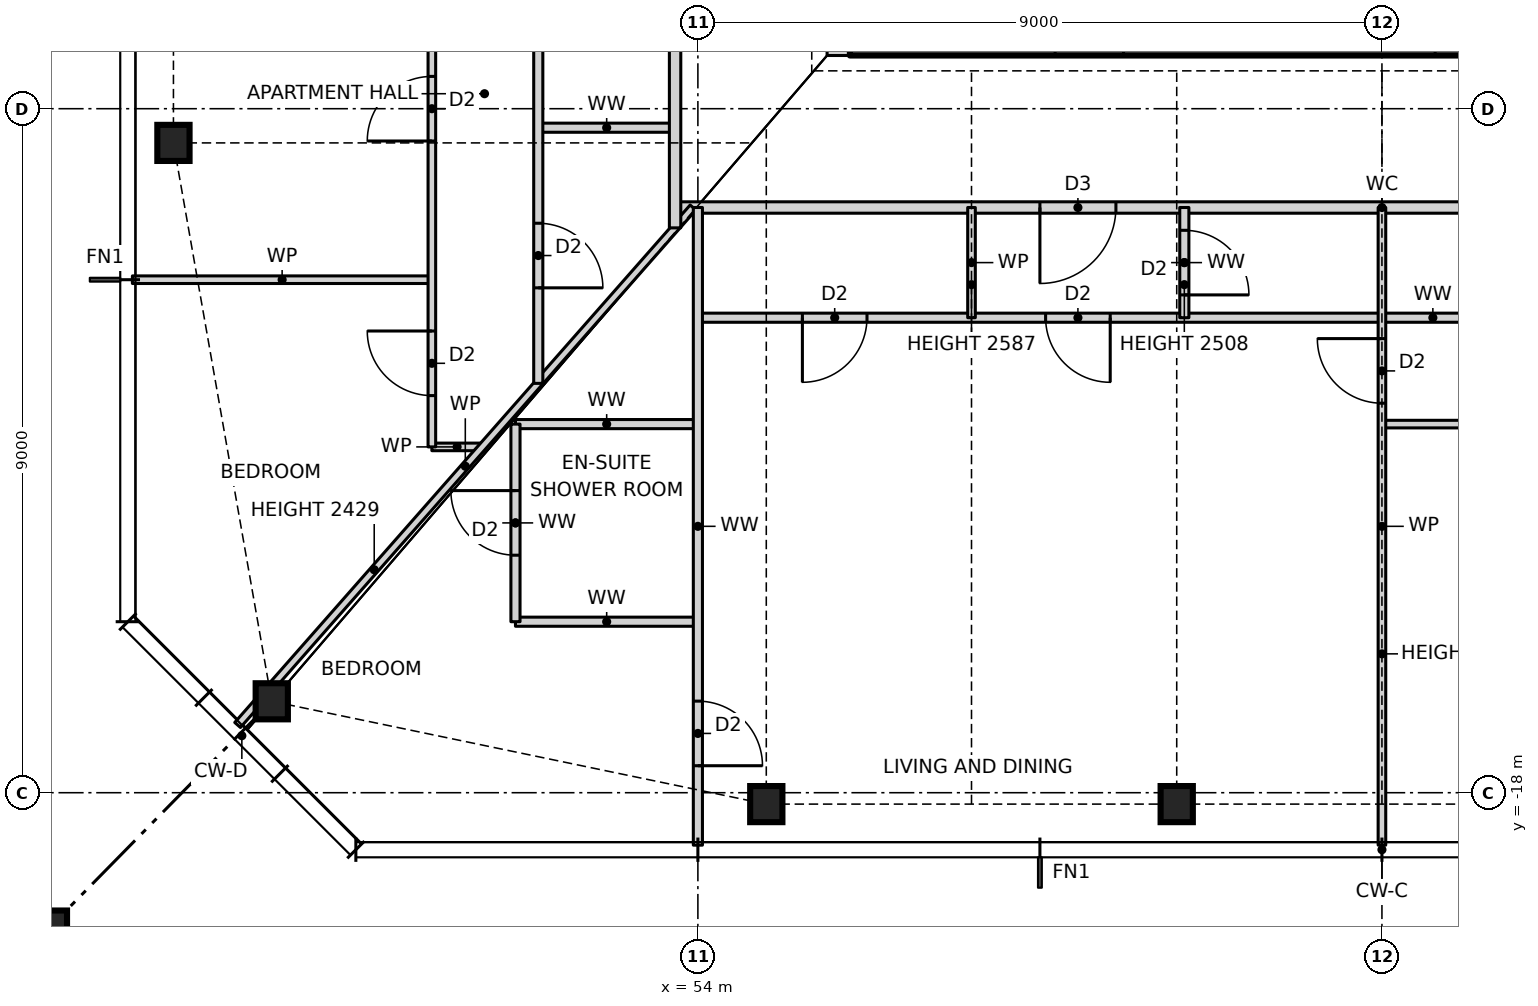
"""IFC4 building model, lengths in metres.
Left out: names, types, materials, properties, quantities, classifications, styles, units other than length and angle.
Written with IfcOpenShell. Run it as: python <this file> out.ifc"""

import sys

from ifc_helpers import new_model, si_unit, direction, frame, frame_2d, origin, origin_2d, place, context, subcontext, project, spatial, rectangle, hollow_rectangle, i_section, extrude, element, fill, save


model = new_model("IFC4")
c1 = context("Model", 3, precision=1e-05, world=origin(), true_north=direction((0.0, 1.0)))
c2 = subcontext(c1, "Body", "Model", "MODEL_VIEW")
j1 = project(units=[si_unit("LENGTHUNIT", "METRE"), si_unit("PLANEANGLEUNIT", "RADIAN")], contexts=[c1])
p1 = place(None, origin())
s1 = spatial("IfcSite", under=j1, at=p1, CompositionType="ELEMENT")
p2 = place(p1, origin())
s2 = spatial("IfcBuilding", under=s1, at=p2, CompositionType="ELEMENT")
p3 = place(p2, frame((0.0, 0.0, 53.5)))
s3 = spatial("IfcBuildingStorey", under=s2, at=p3, CompositionType="ELEMENT", Elevation=53.5)
for number, where, z_axis, x_axis in (
    (1, (48.394, -16.797, 0.0), (0.0, 0.0, 1.0), (1.0, 0.0, 0.0)),
    (2, (54.9, -18.15, 0.0), (0.0, 0.0, 1.0), (1.0, 0.0, 0.0)),
    (3, (60.3, -18.15, 0.0), (0.0, 0.0, 1.0), (1.0, 0.0, 0.0)),
    (4, (47.1, -9.45, 0.0), (0.0, 0.0, 1.0), (1.0, 0.0, 0.0)),
):
    element("IfcColumn", number, at=place(p3, frame(where, z_axis=z_axis, x_axis=x_axis)), inside=s3, PredefinedType="COLUMN", context=c2, shape_type="SweptSolid", body=[
        extrude(i_section(OverallWidth=0.424, OverallDepth=0.475, WebThickness=0.048, FlangeThickness=0.077, at=origin_2d()), origin(), (0.0, 0.0, 1.0), 3.5),
    ])
p4 = place(p3, frame((45.1, -20.15, 0.0), z_axis=(0.0, 0.0, 1.0), x_axis=(1.0, 0.0, 0.0)))
e5 = element("IfcColumn", 5, at=p4, inside=s3, PredefinedType="COLUMN", context=c2, shape_type="SweptSolid", body=[
    extrude(hollow_rectangle(XDim=1.2, YDim=1.2, WallThickness=0.07, at=origin_2d()), origin(), (0.0, 0.0, 1.0), 3.5),
])
p5 = place(p3, frame((55.7, -8.15, 0.0), z_axis=(0.0, 0.0, 1.0), x_axis=(1.0, 0.0, 0.0)))
e6 = element("IfcWall", 6, at=p5, inside=s3, PredefinedType="SOLIDWALL", context=c2, shape_type="SweptSolid", body=[
    extrude(rectangle(XDim=0.3, YDim=0.3, at=frame_2d((0.15, 0.0))), origin(), (0.0, 0.0, 1.0), 3.5),
])
p6 = place(p3, frame((56.0, -8.0, 0.0), z_axis=(0.0, 0.0, 1.0), x_axis=(1.0, 0.0, 0.0)))
e7 = element("IfcWall", 7, at=p6, inside=s3, PredefinedType="SHEAR", context=c2, shape_type="SweptSolid", body=[
    extrude(rectangle(XDim=14.0, YDim=0.6, at=frame_2d((7.0, 0.0))), origin(), (0.0, 0.0, 1.0), 3.5),
])
p7 = place(p6, frame((2.7, 0.0, 0.0)))
e8 = element("IfcOpeningElement", 8, at=p7, cuts=e7, PredefinedType="OPENING", context=c2, shape_type="SweptSolid", body=[
    extrude(rectangle(XDim=0.9, YDim=2.1, at=frame_2d((0.45, 1.05))), frame((0.0, 0.31, 0.0), z_axis=(0.0, -1.0, 0.0), x_axis=(1.0, 0.0, 0.0)), (0.0, 0.0, 1.0), 0.62),
])
p8 = place(p6, frame((7.7, 0.0, 0.0)))
e9 = element("IfcOpeningElement", 9, at=p8, cuts=e7, PredefinedType="OPENING", context=c2, shape_type="SweptSolid", body=[
    extrude(rectangle(XDim=0.9, YDim=2.1, at=frame_2d((0.45, 1.05))), frame((0.0, 0.31, 0.0), z_axis=(0.0, -1.0, 0.0), x_axis=(1.0, 0.0, 0.0)), (0.0, 0.0, 1.0), 0.62),
])
p9 = place(p3, frame((51.6, -15.75, 0.0), z_axis=(0.0, 0.0, 1.0), x_axis=(1.0, 0.0, 0.0)))
e10 = element("IfcWall", 10, at=p9, inside=s3, PredefinedType="PARTITIONING", context=c2, shape_type="SweptSolid", body=[
    extrude(rectangle(XDim=2.4, YDim=0.12, at=frame_2d((1.2, 0.0))), origin(), (0.0, 0.0, 1.0), 3.27),
])
p10 = place(p3, frame((50.5, -13.45, 0.0), z_axis=(0.0, 0.0, 1.0), x_axis=(1.0, 0.0, 0.0)))
e11 = element("IfcWall", 11, at=p10, inside=s3, PredefinedType="PARTITIONING", context=c2, shape_type="SweptSolid", body=[
    extrude(rectangle(XDim=0.664, YDim=0.1, at=frame_2d((0.332, 0.0))), origin(), (0.0, 0.0, 1.0), 3.27),
])
p11 = place(p3, frame((51.6, -13.15, 0.0), z_axis=(0.0, 0.0, 1.0), x_axis=(1.0, 0.0, 0.0)))
e12 = element("IfcWall", 12, at=p11, inside=s3, PredefinedType="PARTITIONING", context=c2, shape_type="SweptSolid", body=[
    extrude(rectangle(XDim=2.4, YDim=0.12, at=frame_2d((1.2, 0.0))), origin(), (0.0, 0.0, 1.0), 3.27),
])
p12 = place(p3, frame((63.0, -13.15, 0.0), z_axis=(0.0, 0.0, 1.0), x_axis=(1.0, 0.0, 0.0)))
e13 = element("IfcWall", 13, at=p12, inside=s3, PredefinedType="PARTITIONING", context=c2, shape_type="SweptSolid", body=[
    extrude(rectangle(XDim=11.2, YDim=0.1, at=frame_2d((5.6, 0.0))), origin(), (0.0, 0.0, 1.0), 3.27),
])
p13 = place(p12, frame((1.825, 0.0, 0.0)))
e14 = element("IfcOpeningElement", 14, at=p13, cuts=e13, PredefinedType="OPENING", context=c2, shape_type="SweptSolid", body=[
    extrude(rectangle(XDim=0.85, YDim=2.1, at=frame_2d((0.425, 1.05))), frame((0.0, 0.06, 0.0), z_axis=(0.0, -1.0, 0.0), x_axis=(1.0, 0.0, 0.0)), (0.0, 0.0, 1.0), 0.12),
])
p14 = place(p12, frame((6.325, 0.0, 0.0)))
e15 = element("IfcOpeningElement", 15, at=p14, cuts=e13, PredefinedType="OPENING", context=c2, shape_type="SweptSolid", body=[
    extrude(rectangle(XDim=0.85, YDim=2.1, at=frame_2d((0.425, 1.05))), frame((0.0, 0.06, 0.0), z_axis=(0.0, -1.0, 0.0), x_axis=(1.0, 0.0, 0.0)), (0.0, 0.0, 1.0), 0.12),
])
p15 = place(p12, frame((9.675, 0.0, 0.0)))
e16 = element("IfcOpeningElement", 16, at=p15, cuts=e13, PredefinedType="OPENING", context=c2, shape_type="SweptSolid", body=[
    extrude(rectangle(XDim=0.85, YDim=2.1, at=frame_2d((0.425, 1.05))), frame((0.0, 0.06, 0.0), z_axis=(0.0, -1.0, 0.0), x_axis=(1.0, 0.0, 0.0)), (0.0, 0.0, 1.0), 0.12),
])
p16 = place(p3, frame((54.0, -11.75, 0.0), z_axis=(0.0, 0.0, 1.0), x_axis=(1.0, 0.0, 0.0)))
e17 = element("IfcWall", 17, at=p16, inside=s3, PredefinedType="PARTITIONING", context=c2, shape_type="SweptSolid", body=[
    extrude(rectangle(XDim=19.34, YDim=0.12, at=frame_2d((9.67, 0.0))), origin(), (0.0, 0.0, 1.0), 3.27),
])
p17 = place(p16, frame((1.375, 0.0, 0.0)))
e18 = element("IfcOpeningElement", 18, at=p17, cuts=e17, PredefinedType="OPENING", context=c2, shape_type="SweptSolid", body=[
    extrude(rectangle(XDim=0.85, YDim=2.1, at=frame_2d((0.425, 1.05))), frame((0.0, 0.07, 0.0), z_axis=(0.0, -1.0, 0.0), x_axis=(1.0, 0.0, 0.0)), (0.0, 0.0, 1.0), 0.14),
])
p18 = place(p16, frame((4.575, 0.0, 0.0)))
e19 = element("IfcOpeningElement", 19, at=p18, cuts=e17, PredefinedType="OPENING", context=c2, shape_type="SweptSolid", body=[
    extrude(rectangle(XDim=0.85, YDim=2.1, at=frame_2d((0.425, 1.05))), frame((0.0, 0.07, 0.0), z_axis=(0.0, -1.0, 0.0), x_axis=(1.0, 0.0, 0.0)), (0.0, 0.0, 1.0), 0.14),
])
p19 = place(p16, frame((11.325, 0.0, 0.0)))
e20 = element("IfcOpeningElement", 20, at=p19, cuts=e17, PredefinedType="OPENING", context=c2, shape_type="SweptSolid", body=[
    extrude(rectangle(XDim=0.85, YDim=2.1, at=frame_2d((0.425, 1.05))), frame((0.0, 0.07, 0.0), z_axis=(0.0, -1.0, 0.0), x_axis=(1.0, 0.0, 0.0)), (0.0, 0.0, 1.0), 0.14),
])
p20 = place(p16, frame((16.495, 0.0, 0.0)))
e21 = element("IfcOpeningElement", 21, at=p20, cuts=e17, PredefinedType="OPENING", context=c2, shape_type="SweptSolid", body=[
    extrude(rectangle(XDim=0.85, YDim=2.1, at=frame_2d((0.425, 1.05))), frame((0.0, 0.07, 0.0), z_axis=(0.0, -1.0, 0.0), x_axis=(1.0, 0.0, 0.0)), (0.0, 0.0, 1.0), 0.14),
])
p21 = place(p3, frame((46.56, -11.25, 0.0), z_axis=(0.0, 0.0, 1.0), x_axis=(1.0, 0.0, 0.0)))
e22 = element("IfcWall", 22, at=p21, inside=s3, PredefinedType="PARTITIONING", context=c2, shape_type="SweptSolid", body=[
    extrude(rectangle(XDim=3.94, YDim=0.1, at=frame_2d((1.97, 0.0))), origin(), (0.0, 0.0, 1.0), 3.27),
])
p22 = place(p3, frame((53.7, -10.3, 0.0), z_axis=(0.0, 0.0, 1.0), x_axis=(1.0, 0.0, 0.0)))
e23 = element("IfcWall", 23, at=p22, inside=s3, PredefinedType="PARTITIONING", context=c2, shape_type="SweptSolid", body=[
    extrude(rectangle(XDim=18.6, YDim=0.15, at=frame_2d((9.3, 0.0))), origin(), (0.0, 0.0, 1.0), 3.27),
])
p23 = place(p22, frame((4.8, 0.0, 0.0)))
e24 = element("IfcOpeningElement", 24, at=p23, cuts=e23, PredefinedType="OPENING", context=c2, shape_type="SweptSolid", body=[
    extrude(rectangle(XDim=1.0, YDim=2.1, at=frame_2d((0.5, 1.05))), frame((0.0, 0.085, 0.0), z_axis=(0.0, -1.0, 0.0), x_axis=(1.0, 0.0, 0.0)), (0.0, 0.0, 1.0), 0.17),
])
p24 = place(p3, frame((51.9, -9.25, 0.0), z_axis=(0.0, 0.0, 1.0), x_axis=(1.0, 0.0, 0.0)))
e25 = element("IfcWall", 25, at=p24, inside=s3, PredefinedType="PARTITIONING", context=c2, shape_type="SweptSolid", body=[
    extrude(rectangle(XDim=1.8, YDim=0.12, at=frame_2d((0.9, 0.0))), origin(), (0.0, 0.0, 1.0), 3.27),
])
p25 = place(p3, frame((47.944, -17.109, 0.0), z_axis=(0.0, 0.0, 1.0), x_axis=(0.660638210404, 0.750704439146, 0.0)))
e26 = element("IfcWall", 26, at=p25, inside=s3, PredefinedType="PARTITIONING", context=c2, shape_type="SweptSolid", body=[
    extrude(rectangle(XDim=9.07, YDim=0.1, at=frame_2d((4.535, 0.0))), origin(), (0.0, 0.0, 1.0), 2.429),
])
p26 = place(p3, frame((63.0, -18.69, 0.0), z_axis=(0.0, 0.0, 1.0), x_axis=(0.0, 1.0, 0.0)))
e27 = element("IfcWall", 27, at=p26, inside=s3, PredefinedType="PARTITIONING", context=c2, shape_type="SweptSolid", body=[
    extrude(rectangle(XDim=8.39, YDim=0.1, at=frame_2d((4.195, 0.0))), origin(), (0.0, 0.0, 1.0), 2.587),
])
p27 = place(p26, frame((5.815, 0.0, 0.0)))
e28 = element("IfcOpeningElement", 28, at=p27, cuts=e27, PredefinedType="OPENING", context=c2, shape_type="SweptSolid", body=[
    extrude(rectangle(XDim=0.85, YDim=2.1, at=frame_2d((0.425, 1.05))), frame((0.0, 0.06, 0.0), z_axis=(0.0, -1.0, 0.0), x_axis=(1.0, 0.0, 0.0)), (0.0, 0.0, 1.0), 0.12),
])
p28 = place(p3, frame((60.4, -11.75, 0.0), z_axis=(0.0, 0.0, 1.0), x_axis=(0.0, 1.0, 0.0)))
e29 = element("IfcWall", 29, at=p28, inside=s3, PredefinedType="PARTITIONING", context=c2, shape_type="SweptSolid", body=[
    extrude(rectangle(XDim=1.45, YDim=0.12, at=frame_2d((0.725, 0.0))), origin(), (0.0, 0.0, 1.0), 2.508),
])
p29 = place(p28, frame((0.3, 0.0, 0.0)))
e30 = element("IfcOpeningElement", 30, at=p29, cuts=e29, PredefinedType="OPENING", context=c2, shape_type="SweptSolid", body=[
    extrude(rectangle(XDim=0.85, YDim=2.1, at=frame_2d((0.425, 1.05))), frame((0.0, 0.07, 0.0), z_axis=(0.0, -1.0, 0.0), x_axis=(1.0, 0.0, 0.0)), (0.0, 0.0, 1.0), 0.14),
])
p30 = place(p3, frame((57.6, -11.75, 0.0), z_axis=(0.0, 0.0, 1.0), x_axis=(0.0, 1.0, 0.0)))
e31 = element("IfcWall", 31, at=p30, inside=s3, PredefinedType="PARTITIONING", context=c2, shape_type="SweptSolid", body=[
    extrude(rectangle(XDim=1.45, YDim=0.1, at=frame_2d((0.725, 0.0))), origin(), (0.0, 0.0, 1.0), 2.587),
])
p31 = place(p3, frame((54.0, -18.69, 0.0), z_axis=(0.0, 0.0, 1.0), x_axis=(0.0, 1.0, 0.0)))
e32 = element("IfcWall", 32, at=p31, inside=s3, PredefinedType="PARTITIONING", context=c2, shape_type="SweptSolid", body=[
    extrude(rectangle(XDim=8.39, YDim=0.12, at=frame_2d((4.195, 0.0))), origin(), (0.0, 0.0, 1.0), 3.27),
])
p32 = place(p31, frame((1.045, 0.0, 0.0)))
e33 = element("IfcOpeningElement", 33, at=p32, cuts=e32, PredefinedType="OPENING", context=c2, shape_type="SweptSolid", body=[
    extrude(rectangle(XDim=0.85, YDim=2.1, at=frame_2d((0.425, 1.05))), frame((0.0, 0.07, 0.0), z_axis=(0.0, -1.0, 0.0), x_axis=(1.0, 0.0, 0.0)), (0.0, 0.0, 1.0), 0.14),
])
p33 = place(p3, frame((53.7, -10.568, 0.0), z_axis=(0.0, 0.0, 1.0), x_axis=(0.0, 1.0, 0.0)))
e34 = element("IfcWall", 34, at=p33, inside=s3, PredefinedType="PARTITIONING", context=c2, shape_type="SweptSolid", body=[
    extrude(rectangle(XDim=21.136, YDim=0.15, at=frame_2d((10.568, 0.0))), origin(), (0.0, 0.0, 1.0), 3.27),
])
p34 = place(p33, frame((16.318, 0.0, 0.0)))
e35 = element("IfcOpeningElement", 35, at=p34, cuts=e34, PredefinedType="OPENING", context=c2, shape_type="SweptSolid", body=[
    extrude(rectangle(XDim=1.0, YDim=2.1, at=frame_2d((0.5, 1.05))), frame((0.0, 0.085, 0.0), z_axis=(0.0, -1.0, 0.0), x_axis=(1.0, 0.0, 0.0)), (0.0, 0.0, 1.0), 0.17),
])
p35 = place(p33, frame((10.918, 0.0, 0.0)))
e36 = element("IfcOpeningElement", 36, at=p35, cuts=e34, PredefinedType="OPENING", context=c2, shape_type="SweptSolid", body=[
    extrude(rectangle(XDim=1.0, YDim=2.1, at=frame_2d((0.5, 1.05))), frame((0.0, 0.085, 0.0), z_axis=(0.0, -1.0, 0.0), x_axis=(1.0, 0.0, 0.0)), (0.0, 0.0, 1.0), 0.17),
])
p36 = place(p3, frame((51.9, -12.614, 0.0), z_axis=(0.0, 0.0, 1.0), x_axis=(0.0, 1.0, 0.0)))
e37 = element("IfcWall", 37, at=p36, inside=s3, PredefinedType="PARTITIONING", context=c2, shape_type="SweptSolid", body=[
    extrude(rectangle(XDim=10.364, YDim=0.12, at=frame_2d((5.182, 0.0))), origin(), (0.0, 0.0, 1.0), 3.27),
])
p37 = place(p36, frame((8.639, 0.0, 0.0)))
e38 = element("IfcOpeningElement", 38, at=p37, cuts=e37, PredefinedType="OPENING", context=c2, shape_type="SweptSolid", body=[
    extrude(rectangle(XDim=0.85, YDim=2.1, at=frame_2d((0.425, 1.05))), frame((0.0, 0.07, 0.0), z_axis=(0.0, -1.0, 0.0), x_axis=(1.0, 0.0, 0.0)), (0.0, 0.0, 1.0), 0.14),
])
p38 = place(p36, frame((5.139, 0.0, 0.0)))
e39 = element("IfcOpeningElement", 39, at=p38, cuts=e37, PredefinedType="OPENING", context=c2, shape_type="SweptSolid", body=[
    extrude(rectangle(XDim=0.85, YDim=2.1, at=frame_2d((0.425, 1.05))), frame((0.0, 0.07, 0.0), z_axis=(0.0, -1.0, 0.0), x_axis=(1.0, 0.0, 0.0)), (0.0, 0.0, 1.0), 0.14),
])
p39 = place(p36, frame((1.257, 0.0, 0.0)))
e40 = element("IfcOpeningElement", 40, at=p39, cuts=e37, PredefinedType="OPENING", context=c2, shape_type="SweptSolid", body=[
    extrude(rectangle(XDim=0.85, YDim=2.1, at=frame_2d((0.425, 1.05))), frame((0.0, 0.07, 0.0), z_axis=(0.0, -1.0, 0.0), x_axis=(1.0, 0.0, 0.0)), (0.0, 0.0, 1.0), 0.14),
])
p40 = place(p3, frame((51.6, -15.75, 0.0), z_axis=(0.0, 0.0, 1.0), x_axis=(0.0, 1.0, 0.0)))
e41 = element("IfcWall", 41, at=p40, inside=s3, PredefinedType="PARTITIONING", context=c2, shape_type="SweptSolid", body=[
    extrude(rectangle(XDim=2.6, YDim=0.12, at=frame_2d((1.3, 0.0))), origin(), (0.0, 0.0, 1.0), 3.27),
])
p41 = place(p40, frame((0.875, 0.0, 0.0)))
e42 = element("IfcOpeningElement", 42, at=p41, cuts=e41, PredefinedType="OPENING", context=c2, shape_type="SweptSolid", body=[
    extrude(rectangle(XDim=0.85, YDim=2.1, at=frame_2d((0.425, 1.05))), frame((0.0, 0.07, 0.0), z_axis=(0.0, -1.0, 0.0), x_axis=(1.0, 0.0, 0.0)), (0.0, 0.0, 1.0), 0.14),
])
p42 = place(p3, frame((50.5, -13.45, 0.0), z_axis=(0.0, 0.0, 1.0), x_axis=(0.0, 1.0, 0.0)))
e43 = element("IfcWall", 43, at=p42, inside=s3, PredefinedType="PARTITIONING", context=c2, shape_type="SweptSolid", body=[
    extrude(rectangle(XDim=11.2, YDim=0.1, at=frame_2d((5.6, 0.0))), origin(), (0.0, 0.0, 1.0), 3.27),
])
p43 = place(p42, frame((9.725, 0.0, 0.0)))
e44 = element("IfcOpeningElement", 44, at=p43, cuts=e43, PredefinedType="OPENING", context=c2, shape_type="SweptSolid", body=[
    extrude(rectangle(XDim=0.85, YDim=2.1, at=frame_2d((0.425, 1.05))), frame((0.0, 0.06, 0.0), z_axis=(0.0, -1.0, 0.0), x_axis=(1.0, 0.0, 0.0)), (0.0, 0.0, 1.0), 0.12),
])
p44 = place(p42, frame((4.025, 0.0, 0.0)))
e45 = element("IfcOpeningElement", 45, at=p44, cuts=e43, PredefinedType="OPENING", context=c2, shape_type="SweptSolid", body=[
    extrude(rectangle(XDim=0.85, YDim=2.1, at=frame_2d((0.425, 1.05))), frame((0.0, 0.06, 0.0), z_axis=(0.0, -1.0, 0.0), x_axis=(1.0, 0.0, 0.0)), (0.0, 0.0, 1.0), 0.12),
])
p45 = place(p42, frame((0.675, 0.0, 0.0)))
e46 = element("IfcOpeningElement", 46, at=p45, cuts=e43, PredefinedType="OPENING", context=c2, shape_type="SweptSolid", body=[
    extrude(rectangle(XDim=0.85, YDim=2.1, at=frame_2d((0.425, 1.05))), frame((0.0, 0.06, 0.0), z_axis=(0.0, -1.0, 0.0), x_axis=(1.0, 0.0, 0.0)), (0.0, 0.0, 1.0), 0.12),
])
p46 = place(p17, frame((0.85, 0.0, 0.0), z_axis=(0.0, 0.0, 1.0), x_axis=(-1.0, 0.0, 0.0)))
e47 = element("IfcDoor", 47, at=p46, inside=s3, OperationType="SINGLE_SWING_RIGHT", PredefinedType="DOOR", context=c2, shape_type="SweptSolid", body=[
    extrude(rectangle(XDim=0.85, YDim=2.1, at=frame_2d((0.425, 1.05))), frame((0.0, 0.025, 0.0), z_axis=(0.0, -1.0, 0.0), x_axis=(1.0, 0.0, 0.0)), (0.0, 0.0, 1.0), 0.05),
])
fill(e18, e47)
p47 = place(p23, frame((1.0, 0.0, 0.0), z_axis=(0.0, 0.0, 1.0), x_axis=(-1.0, 0.0, 0.0)))
e48 = element("IfcDoor", 48, at=p47, inside=s3, OperationType="SINGLE_SWING_RIGHT", PredefinedType="DOOR", context=c2, shape_type="SweptSolid", body=[
    extrude(rectangle(XDim=1.0, YDim=2.1, at=frame_2d((0.5, 1.05))), frame((0.0, 0.025, 0.0), z_axis=(0.0, -1.0, 0.0), x_axis=(1.0, 0.0, 0.0)), (0.0, 0.0, 1.0), 0.05),
])
fill(e24, e48)
p48 = place(p18, frame((0.85, 0.0, 0.0), z_axis=(0.0, 0.0, 1.0), x_axis=(-1.0, 0.0, 0.0)))
e49 = element("IfcDoor", 49, at=p48, inside=s3, OperationType="SINGLE_SWING_LEFT", PredefinedType="DOOR", context=c2, shape_type="SweptSolid", body=[
    extrude(rectangle(XDim=0.85, YDim=2.1, at=frame_2d((0.425, 1.05))), frame((0.0, 0.025, 0.0), z_axis=(0.0, -1.0, 0.0), x_axis=(1.0, 0.0, 0.0)), (0.0, 0.0, 1.0), 0.05),
])
fill(e19, e49)
p49 = place(p29, frame((0.85, 0.0, 0.0), z_axis=(0.0, 0.0, 1.0), x_axis=(-1.0, 0.0, 0.0)))
e50 = element("IfcDoor", 50, at=p49, inside=s3, OperationType="SINGLE_SWING_RIGHT", PredefinedType="DOOR", context=c2, shape_type="SweptSolid", body=[
    extrude(rectangle(XDim=0.85, YDim=2.1, at=frame_2d((0.425, 1.05))), frame((0.0, 0.025, 0.0), z_axis=(0.0, -1.0, 0.0), x_axis=(1.0, 0.0, 0.0)), (0.0, 0.0, 1.0), 0.05),
])
fill(e30, e50)
p50 = place(p41, origin())
e51 = element("IfcDoor", 51, at=p50, inside=s3, OperationType="SINGLE_SWING_RIGHT", PredefinedType="DOOR", context=c2, shape_type="SweptSolid", body=[
    extrude(rectangle(XDim=0.85, YDim=2.1, at=frame_2d((0.425, 1.05))), frame((0.0, 0.025, 0.0), z_axis=(0.0, -1.0, 0.0), x_axis=(1.0, 0.0, 0.0)), (0.0, 0.0, 1.0), 0.05),
])
fill(e42, e51)
p51 = place(p32, frame((0.85, 0.0, 0.0), z_axis=(0.0, 0.0, 1.0), x_axis=(-1.0, 0.0, 0.0)))
e52 = element("IfcDoor", 52, at=p51, inside=s3, OperationType="SINGLE_SWING_RIGHT", PredefinedType="DOOR", context=c2, shape_type="SweptSolid", body=[
    extrude(rectangle(XDim=0.85, YDim=2.1, at=frame_2d((0.425, 1.05))), frame((0.0, 0.025, 0.0), z_axis=(0.0, -1.0, 0.0), x_axis=(1.0, 0.0, 0.0)), (0.0, 0.0, 1.0), 0.05),
])
fill(e33, e52)
p52 = place(p27, origin())
e53 = element("IfcDoor", 53, at=p52, inside=s3, OperationType="SINGLE_SWING_RIGHT", PredefinedType="DOOR", context=c2, shape_type="SweptSolid", body=[
    extrude(rectangle(XDim=0.85, YDim=2.1, at=frame_2d((0.425, 1.05))), frame((0.0, 0.025, 0.0), z_axis=(0.0, -1.0, 0.0), x_axis=(1.0, 0.0, 0.0)), (0.0, 0.0, 1.0), 0.05),
])
fill(e28, e53)
p53 = place(p44, origin())
e54 = element("IfcDoor", 54, at=p53, inside=s3, OperationType="SINGLE_SWING_LEFT", PredefinedType="DOOR", context=c2, shape_type="SweptSolid", body=[
    extrude(rectangle(XDim=0.85, YDim=2.1, at=frame_2d((0.425, 1.05))), frame((0.0, 0.025, 0.0), z_axis=(0.0, -1.0, 0.0), x_axis=(1.0, 0.0, 0.0)), (0.0, 0.0, 1.0), 0.05),
])
fill(e45, e54)
p54 = place(p45, origin())
e55 = element("IfcDoor", 55, at=p54, inside=s3, OperationType="SINGLE_SWING_RIGHT", PredefinedType="DOOR", context=c2, shape_type="SweptSolid", body=[
    extrude(rectangle(XDim=0.85, YDim=2.1, at=frame_2d((0.425, 1.05))), frame((0.0, 0.025, 0.0), z_axis=(0.0, -1.0, 0.0), x_axis=(1.0, 0.0, 0.0)), (0.0, 0.0, 1.0), 0.05),
])
fill(e46, e55)
p55 = place(p39, frame((0.85, 0.0, 0.0), z_axis=(0.0, 0.0, 1.0), x_axis=(-1.0, 0.0, 0.0)))
e56 = element("IfcDoor", 56, at=p55, inside=s3, OperationType="SINGLE_SWING_RIGHT", PredefinedType="DOOR", context=c2, shape_type="SweptSolid", body=[
    extrude(rectangle(XDim=0.85, YDim=2.1, at=frame_2d((0.425, 1.05))), frame((0.0, 0.025, 0.0), z_axis=(0.0, -1.0, 0.0), x_axis=(1.0, 0.0, 0.0)), (0.0, 0.0, 1.0), 0.05),
])
fill(e40, e56)
save(model, sys.argv[1])
